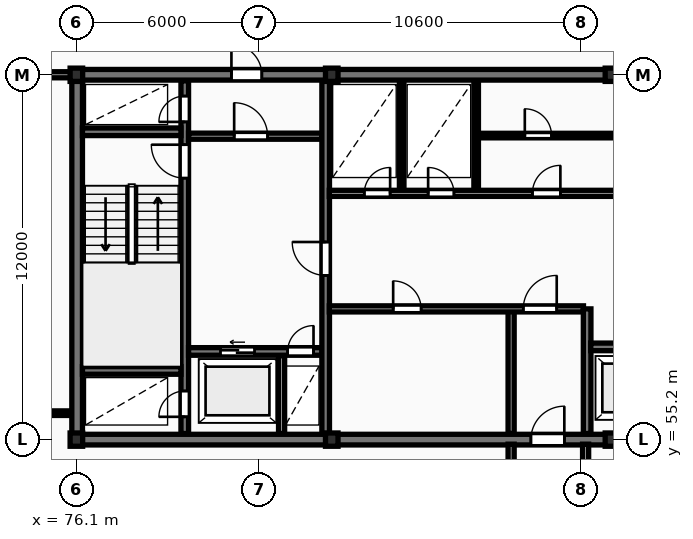
"""IFC4 building model, lengths in metres.
Left out: names, types, materials, properties, quantities, classifications, styles, units other than length and angle.
Written with IfcOpenShell. Run it as: python <this file> out.ifc"""

import sys

from ifc_helpers import new_model, si_unit, direction, frame, frame_2d, origin, origin_2d, place, context, subcontext, project, spatial, rectangle, i_section, extrude, element, fill, save


model = new_model("IFC4")
c1 = context("Model", 3, precision=1e-05, world=origin(), true_north=direction((0.0, 1.0)))
c2 = subcontext(c1, "Body", "Model", "MODEL_VIEW")
j1 = project(units=[si_unit("LENGTHUNIT", "METRE"), si_unit("PLANEANGLEUNIT", "RADIAN")], contexts=[c1])
p1 = place(None, origin())
s1 = spatial("IfcSite", under=j1, at=p1, CompositionType="ELEMENT")
p2 = place(p1, origin())
s2 = spatial("IfcBuilding", under=s1, at=p2, CompositionType="ELEMENT")
p3 = place(p2, frame((0.0, 0.0, 153.7)))
s3 = spatial("IfcBuildingStorey", under=s2, at=p3, CompositionType="ELEMENT", Elevation=153.7)
for number, where, z_axis, x_axis in (
    (1, (76.1, 55.2, 0.0), (0.0, 0.0, 1.0), (1.0, 0.0, 0.0)),
    (2, (76.1, 67.2, 0.0), (0.0, 0.0, 1.0), (1.0, 0.0, 0.0)),
    (3, (84.5, 55.2, 0.0), (0.0, 0.0, 1.0), (1.0, 0.0, 0.0)),
    (4, (84.5, 67.2, 0.0), (0.0, 0.0, 1.0), (1.0, 0.0, 0.0)),
    (5, (93.7, 55.2, 0.0), (0.0, 0.0, 1.0), (1.0, 0.0, 0.0)),
    (6, (93.7, 67.2, 0.0), (0.0, 0.0, 1.0), (1.0, 0.0, 0.0)),
):
    element("IfcColumn", number, at=place(p3, frame(where, z_axis=z_axis, x_axis=x_axis)), inside=s3, PredefinedType="COLUMN", context=c2, shape_type="SweptSolid", body=[
        extrude(i_section(OverallWidth=0.412, OverallDepth=0.437, WebThickness=0.036, FlangeThickness=0.052, FilletRadius=0.015, at=origin_2d()), origin(), (0.0, 0.0, 1.0), 3.6),
    ])
p4 = place(p3, frame((75.95, 55.2, 0.0), z_axis=(0.0, 0.0, 1.0), x_axis=(1.0, 0.0, 0.0)))
e7 = element("IfcWall", 7, at=p4, inside=s3, PredefinedType="SHEAR", context=c2, shape_type="SweptSolid", body=[
    extrude(rectangle(XDim=36.3, YDim=0.35, at=frame_2d((18.15, 0.0))), origin(), (0.0, 0.0, 1.0), 3.6),
])
p5 = place(p4, frame((15.1, 0.0, 0.0)))
e8 = element("IfcOpeningElement", 8, at=p5, cuts=e7, PredefinedType="OPENING", context=c2, shape_type="SweptSolid", body=[
    extrude(rectangle(XDim=1.1, YDim=2.1, at=frame_2d((0.55, 1.05))), frame((0.0, 0.185, 0.0), z_axis=(0.0, -1.0, 0.0), x_axis=(1.0, 0.0, 0.0)), (0.0, 0.0, 1.0), 0.37),
])
p6 = place(p3, frame((76.125, 55.375, 0.0), z_axis=(0.0, 0.0, 1.0), x_axis=(0.0, 1.0, 0.0)))
e9 = element("IfcWall", 9, at=p6, inside=s3, PredefinedType="SHEAR", context=c2, shape_type="SweptSolid", body=[
    extrude(rectangle(XDim=11.65, YDim=0.35, at=frame_2d((5.825, 0.0))), origin(), (0.0, 0.0, 1.0), 3.6),
])
p7 = place(p3, frame((75.95, 67.2, 0.0), z_axis=(0.0, 0.0, 1.0), x_axis=(1.0, 0.0, 0.0)))
e10 = element("IfcWall", 10, at=p7, inside=s3, PredefinedType="SHEAR", context=c2, shape_type="SweptSolid", body=[
    extrude(rectangle(XDim=36.3, YDim=0.35, at=frame_2d((18.15, 0.0))), origin(), (0.0, 0.0, 1.0), 3.6),
])
p8 = place(p7, frame((5.25, 0.0, 0.0)))
e11 = element("IfcOpeningElement", 11, at=p8, cuts=e10, PredefinedType="OPENING", context=c2, shape_type="SweptSolid", body=[
    extrude(rectangle(XDim=1.0, YDim=2.15, at=frame_2d((0.5, 1.075))), frame((0.0, 0.185, 0.0), z_axis=(0.0, -1.0, 0.0), x_axis=(1.0, 0.0, 0.0)), (0.0, 0.0, 1.0), 0.37),
])
p9 = place(p7, frame((21.6, 0.0, 0.0)))
e12 = element("IfcOpeningElement", 12, at=p9, cuts=e10, PredefinedType="OPENING", context=c2, shape_type="SweptSolid", body=[
    extrude(rectangle(XDim=1.5, YDim=2.2, at=frame_2d((0.75, 1.1))), frame((0.0, 0.185, 0.0), z_axis=(0.0, -1.0, 0.0), x_axis=(1.0, 0.0, 0.0)), (0.0, 0.0, 1.0), 0.37),
])
p10 = place(p7, frame((30.45, 0.0, 0.0)))
e13 = element("IfcOpeningElement", 13, at=p10, cuts=e10, PredefinedType="OPENING", context=c2, shape_type="SweptSolid", body=[
    extrude(rectangle(XDim=1.0, YDim=2.15, at=frame_2d((0.5, 1.075))), frame((0.0, 0.185, 0.0), z_axis=(0.0, -1.0, 0.0), x_axis=(1.0, 0.0, 0.0)), (0.0, 0.0, 1.0), 0.37),
])
p11 = place(p3, frame((79.665, 55.4, 0.0), z_axis=(0.0, 0.0, 1.0), x_axis=(0.0, 1.0, 0.0)))
e14 = element("IfcWall", 14, at=p11, inside=s3, PredefinedType="SHEAR", context=c2, shape_type="SweptSolid", body=[
    extrude(rectangle(XDim=11.6, YDim=0.25, at=frame_2d((5.8, 0.0))), origin(), (0.0, 0.0, 1.0), 3.6),
])
p12 = place(p11, frame((0.55, 0.0, 0.0)))
e15 = element("IfcOpeningElement", 15, at=p12, cuts=e14, PredefinedType="OPENING", context=c2, shape_type="SweptSolid", body=[
    extrude(rectangle(XDim=0.85, YDim=2.05, at=frame_2d((0.425, 1.025))), frame((0.0, 0.135, 0.0), z_axis=(0.0, -1.0, 0.0), x_axis=(1.0, 0.0, 0.0)), (0.0, 0.0, 1.0), 0.27),
])
p13 = place(p11, frame((8.4, 0.0, 0.0)))
e16 = element("IfcOpeningElement", 16, at=p13, cuts=e14, PredefinedType="OPENING", context=c2, shape_type="SweptSolid", body=[
    extrude(rectangle(XDim=1.1, YDim=2.1, at=frame_2d((0.55, 1.05))), frame((0.0, 0.135, 0.0), z_axis=(0.0, -1.0, 0.0), x_axis=(1.0, 0.0, 0.0)), (0.0, 0.0, 1.0), 0.27),
])
p14 = place(p11, frame((10.25, 0.0, 0.0)))
e17 = element("IfcOpeningElement", 17, at=p14, cuts=e14, PredefinedType="OPENING", context=c2, shape_type="SweptSolid", body=[
    extrude(rectangle(XDim=0.85, YDim=2.05, at=frame_2d((0.425, 1.025))), frame((0.0, 0.135, 0.0), z_axis=(0.0, -1.0, 0.0), x_axis=(1.0, 0.0, 0.0)), (0.0, 0.0, 1.0), 0.27),
])
for number, where, z_axis, x_axis in (
    (18, (76.3, 57.475, 0.0), (0.0, 0.0, 1.0), (1.0, 0.0, 0.0)),
    (19, (76.3, 65.325, 0.0), (0.0, 0.0, 1.0), (1.0, 0.0, 0.0)),
):
    element("IfcWall", number, at=place(p3, frame(where, z_axis=z_axis, x_axis=x_axis)), inside=s3, PredefinedType="SHEAR", context=c2, shape_type="SweptSolid", body=[
        extrude(rectangle(XDim=3.24, YDim=0.25, at=frame_2d((1.62, 0.0))), origin(), (0.0, 0.0, 1.0), 3.6),
    ])
p15 = place(p3, frame((79.79, 58.1, 0.0), z_axis=(0.0, 0.0, 1.0), x_axis=(1.0, 0.0, 0.0)))
e20 = element("IfcWall", 20, at=p15, inside=s3, PredefinedType="SHEAR", context=c2, shape_type="SweptSolid", body=[
    extrude(rectangle(XDim=4.39, YDim=0.25, at=frame_2d((2.195, 0.0))), origin(), (0.0, 0.0, 1.0), 3.6),
])
p16 = place(p15, frame((1.05, 0.0, 0.0)))
e21 = element("IfcOpeningElement", 21, at=p16, cuts=e20, PredefinedType="OPENING", context=c2, shape_type="SweptSolid", body=[
    extrude(rectangle(XDim=1.12, YDim=2.12, at=frame_2d((0.56, 1.06))), frame((0.0, 0.135, 0.0), z_axis=(0.0, -1.0, 0.0), x_axis=(1.0, 0.0, 0.0)), (0.0, 0.0, 1.0), 0.27),
])
p17 = place(p15, frame((3.26, 0.0, 0.0)))
e22 = element("IfcOpeningElement", 22, at=p17, cuts=e20, PredefinedType="OPENING", context=c2, shape_type="SweptSolid", body=[
    extrude(rectangle(XDim=0.85, YDim=2.05, at=frame_2d((0.425, 1.025))), frame((0.0, 0.135, 0.0), z_axis=(0.0, -1.0, 0.0), x_axis=(1.0, 0.0, 0.0)), (0.0, 0.0, 1.0), 0.27),
])
p18 = place(p3, frame((82.85, 55.4, 0.0), z_axis=(0.0, 0.0, 1.0), x_axis=(0.0, 1.0, 0.0)))
e23 = element("IfcWall", 23, at=p18, inside=s3, PredefinedType="PARTITIONING", context=c2, shape_type="SweptSolid", body=[
    extrude(rectangle(XDim=2.56, YDim=0.2, at=frame_2d((1.28, 0.0))), origin(), (0.0, 0.0, 1.0), 3.32),
])
p19 = place(p3, frame((79.79, 65.18, 0.0), z_axis=(0.0, 0.0, 1.0), x_axis=(1.0, 0.0, 0.0)))
e24 = element("IfcWall", 24, at=p19, inside=s3, PredefinedType="PARTITIONING", context=c2, shape_type="SweptSolid", body=[
    extrude(rectangle(XDim=4.39, YDim=0.2, at=frame_2d((2.195, 0.0))), origin(), (0.0, 0.0, 1.0), 3.32),
])
p20 = place(p19, frame((1.5, 0.0, 0.0)))
e25 = element("IfcOpeningElement", 25, at=p20, cuts=e24, PredefinedType="OPENING", context=c2, shape_type="SweptSolid", body=[
    extrude(rectangle(XDim=1.1, YDim=2.1, at=frame_2d((0.55, 1.05))), frame((0.0, 0.11, 0.0), z_axis=(0.0, -1.0, 0.0), x_axis=(1.0, 0.0, 0.0)), (0.0, 0.0, 1.0), 0.22),
])
p21 = place(p3, frame((84.3, 55.4, 0.0), z_axis=(0.0, 0.0, 1.0), x_axis=(0.0, 1.0, 0.0)))
e26 = element("IfcWall", 26, at=p21, inside=s3, PredefinedType="SHEAR", context=c2, shape_type="SweptSolid", body=[
    extrude(rectangle(XDim=11.6, YDim=0.25, at=frame_2d((5.8, 0.0))), origin(), (0.0, 0.0, 1.0), 3.6),
])
p22 = place(p21, frame((5.2, 0.0, 0.0)))
e27 = element("IfcOpeningElement", 27, at=p22, cuts=e26, PredefinedType="OPENING", context=c2, shape_type="SweptSolid", body=[
    extrude(rectangle(XDim=1.1, YDim=2.1, at=frame_2d((0.55, 1.05))), frame((0.0, 0.135, 0.0), z_axis=(0.0, -1.0, 0.0), x_axis=(1.0, 0.0, 0.0)), (0.0, 0.0, 1.0), 0.27),
])
p23 = place(p3, frame((90.4, 55.4, 0.0), z_axis=(0.0, 0.0, 1.0), x_axis=(0.0, 1.0, 0.0)))
e28 = element("IfcWall", 28, at=p23, inside=s3, PredefinedType="PARTITIONING", context=c2, shape_type="SweptSolid", body=[
    extrude(rectangle(XDim=4.1, YDim=0.2, at=frame_2d((2.05, 0.0))), origin(), (0.0, 0.0, 1.0), 3.32),
])
p24 = place(p3, frame((84.42, 59.5, 0.0), z_axis=(0.0, 0.0, 1.0), x_axis=(1.0, 0.0, 0.0)))
e29 = element("IfcWall", 29, at=p24, inside=s3, PredefinedType="PARTITIONING", context=c2, shape_type="SweptSolid", body=[
    extrude(rectangle(XDim=8.36, YDim=0.2, at=frame_2d((4.18, 0.0))), origin(), (0.0, 0.0, 1.0), 3.32),
])
p25 = place(p24, frame((2.1, 0.0, 0.0)))
e30 = element("IfcOpeningElement", 30, at=p25, cuts=e29, PredefinedType="OPENING", context=c2, shape_type="SweptSolid", body=[
    extrude(rectangle(XDim=0.92, YDim=2.08, at=frame_2d((0.46, 1.04))), frame((0.0, 0.11, 0.0), z_axis=(0.0, -1.0, 0.0), x_axis=(1.0, 0.0, 0.0)), (0.0, 0.0, 1.0), 0.22),
])
p26 = place(p24, frame((6.38, 0.0, 0.0)))
e31 = element("IfcOpeningElement", 31, at=p26, cuts=e29, PredefinedType="OPENING", context=c2, shape_type="SweptSolid", body=[
    extrude(rectangle(XDim=1.1, YDim=2.1, at=frame_2d((0.55, 1.05))), frame((0.0, 0.11, 0.0), z_axis=(0.0, -1.0, 0.0), x_axis=(1.0, 0.0, 0.0)), (0.0, 0.0, 1.0), 0.22),
])
p27 = place(p3, frame((92.9, 55.4, 0.0), z_axis=(0.0, 0.0, 1.0), x_axis=(0.0, 1.0, 0.0)))
e32 = element("IfcWall", 32, at=p27, inside=s3, PredefinedType="SHEAR", context=c2, shape_type="SweptSolid", body=[
    extrude(rectangle(XDim=4.1, YDim=0.25, at=frame_2d((2.05, 0.0))), origin(), (0.0, 0.0, 1.0), 3.6),
])
p28 = place(p3, frame((93.02, 58.25, 0.0), z_axis=(0.0, 0.0, 1.0), x_axis=(1.0, 0.0, 0.0)))
e33 = element("IfcWall", 33, at=p28, inside=s3, PredefinedType="SHEAR", context=c2, shape_type="SweptSolid", body=[
    extrude(rectangle(XDim=8.36, YDim=0.25, at=frame_2d((4.18, 0.0))), origin(), (0.0, 0.0, 1.0), 3.6),
])
p29 = place(p28, frame((0.82, 0.0, 0.0)))
e34 = element("IfcOpeningElement", 34, at=p29, cuts=e33, PredefinedType="OPENING", context=c2, shape_type="SweptSolid", body=[
    extrude(rectangle(XDim=1.12, YDim=2.12, at=frame_2d((0.56, 1.06))), frame((0.0, 0.135, 0.0), z_axis=(0.0, -1.0, 0.0), x_axis=(1.0, 0.0, 0.0)), (0.0, 0.0, 1.0), 0.27),
])
p30 = place(p28, frame((3.62, 0.0, 0.0)))
e35 = element("IfcOpeningElement", 35, at=p30, cuts=e33, PredefinedType="OPENING", context=c2, shape_type="SweptSolid", body=[
    extrude(rectangle(XDim=1.12, YDim=2.12, at=frame_2d((0.56, 1.06))), frame((0.0, 0.135, 0.0), z_axis=(0.0, -1.0, 0.0), x_axis=(1.0, 0.0, 0.0)), (0.0, 0.0, 1.0), 0.27),
])
p31 = place(p28, frame((6.42, 0.0, 0.0)))
e36 = element("IfcOpeningElement", 36, at=p31, cuts=e33, PredefinedType="OPENING", context=c2, shape_type="SweptSolid", body=[
    extrude(rectangle(XDim=1.12, YDim=2.12, at=frame_2d((0.56, 1.06))), frame((0.0, 0.135, 0.0), z_axis=(0.0, -1.0, 0.0), x_axis=(1.0, 0.0, 0.0)), (0.0, 0.0, 1.0), 0.27),
])
for number, where, z_axis, x_axis in (
    (37, (86.8, 63.4, 0.0), (0.0, 0.0, 1.0), (0.0, 1.0, 0.0)),
    (38, (89.25, 63.4, 0.0), (0.0, 0.0, 1.0), (0.0, 1.0, 0.0)),
):
    element("IfcWall", number, at=place(p3, frame(where, z_axis=z_axis, x_axis=x_axis)), inside=s3, PredefinedType="PARTITIONING", context=c2, shape_type="SweptSolid", body=[
        extrude(rectangle(XDim=3.6, YDim=0.15, at=frame_2d((1.8, 0.0))), origin(), (0.0, 0.0, 1.0), 3.32),
    ])
p32 = place(p3, frame((89.25, 65.2, 0.0), z_axis=(0.0, 0.0, 1.0), x_axis=(1.0, 0.0, 0.0)))
e39 = element("IfcWall", 39, at=p32, inside=s3, PredefinedType="PARTITIONING", context=c2, shape_type="SweptSolid", body=[
    extrude(rectangle(XDim=7.05, YDim=0.15, at=frame_2d((3.525, 0.0))), origin(), (0.0, 0.0, 1.0), 3.32),
])
p33 = place(p32, frame((1.6, 0.0, 0.0)))
e40 = element("IfcOpeningElement", 40, at=p33, cuts=e39, PredefinedType="OPENING", context=c2, shape_type="SweptSolid", body=[
    extrude(rectangle(XDim=0.88, YDim=2.06, at=frame_2d((0.44, 1.03))), frame((0.0, 0.085, 0.0), z_axis=(0.0, -1.0, 0.0), x_axis=(1.0, 0.0, 0.0)), (0.0, 0.0, 1.0), 0.17),
])
p34 = place(p3, frame((84.42, 63.3, 0.0), z_axis=(0.0, 0.0, 1.0), x_axis=(1.0, 0.0, 0.0)))
e41 = element("IfcWall", 41, at=p34, inside=s3, PredefinedType="PARTITIONING", context=c2, shape_type="SweptSolid", body=[
    extrude(rectangle(XDim=19.83, YDim=0.2, at=frame_2d((9.915, 0.0))), origin(), (0.0, 0.0, 1.0), 3.32),
])
p35 = place(p34, frame((1.15, 0.0, 0.0)))
e42 = element("IfcOpeningElement", 42, at=p35, cuts=e41, PredefinedType="OPENING", context=c2, shape_type="SweptSolid", body=[
    extrude(rectangle(XDim=0.85, YDim=2.05, at=frame_2d((0.425, 1.025))), frame((0.0, 0.11, 0.0), z_axis=(0.0, -1.0, 0.0), x_axis=(1.0, 0.0, 0.0)), (0.0, 0.0, 1.0), 0.22),
])
p36 = place(p34, frame((3.25, 0.0, 0.0)))
e43 = element("IfcOpeningElement", 43, at=p36, cuts=e41, PredefinedType="OPENING", context=c2, shape_type="SweptSolid", body=[
    extrude(rectangle(XDim=0.85, YDim=2.05, at=frame_2d((0.425, 1.025))), frame((0.0, 0.11, 0.0), z_axis=(0.0, -1.0, 0.0), x_axis=(1.0, 0.0, 0.0)), (0.0, 0.0, 1.0), 0.22),
])
p37 = place(p34, frame((13.08, 0.0, 0.0)))
e44 = element("IfcOpeningElement", 44, at=p37, cuts=e41, PredefinedType="OPENING", context=c2, shape_type="SweptSolid", body=[
    extrude(rectangle(XDim=1.5, YDim=2.2, at=frame_2d((0.75, 1.1))), frame((0.0, 0.11, 0.0), z_axis=(0.0, -1.0, 0.0), x_axis=(1.0, 0.0, 0.0)), (0.0, 0.0, 1.0), 0.22),
])
p38 = place(p34, frame((6.68, 0.0, 0.0)))
e45 = element("IfcOpeningElement", 45, at=p38, cuts=e41, PredefinedType="OPENING", context=c2, shape_type="SweptSolid", body=[
    extrude(rectangle(XDim=0.92, YDim=2.08, at=frame_2d((0.46, 1.04))), frame((0.0, 0.11, 0.0), z_axis=(0.0, -1.0, 0.0), x_axis=(1.0, 0.0, 0.0)), (0.0, 0.0, 1.0), 0.22),
])
p39 = place(p34, frame((16.33, 0.0, 0.0)))
e46 = element("IfcOpeningElement", 46, at=p39, cuts=e41, PredefinedType="OPENING", context=c2, shape_type="SweptSolid", body=[
    extrude(rectangle(XDim=0.88, YDim=2.06, at=frame_2d((0.44, 1.03))), frame((0.0, 0.11, 0.0), z_axis=(0.0, -1.0, 0.0), x_axis=(1.0, 0.0, 0.0)), (0.0, 0.0, 1.0), 0.22),
])
p40 = place(p3, frame((69.17, 56.07, 0.0), z_axis=(0.0, 0.0, 1.0), x_axis=(1.0, 0.0, 0.0)))
e47 = element("IfcWall", 47, at=p40, inside=s3, PredefinedType="PARTITIONING", context=c2, shape_type="SweptSolid", body=[
    extrude(rectangle(XDim=6.76, YDim=0.15, at=frame_2d((3.38, 0.0))), origin(), (0.0, 0.0, 1.0), 3.32),
])
p41 = place(p40, frame((1.362, 0.0, 0.0)))
e48 = element("IfcOpeningElement", 48, at=p41, cuts=e47, PredefinedType="OPENING", context=c2, shape_type="SweptSolid", body=[
    extrude(rectangle(XDim=0.84, YDim=2.04, at=frame_2d((0.42, 1.02))), frame((0.0, 0.085, 0.0), z_axis=(0.0, -1.0, 0.0), x_axis=(1.0, 0.0, 0.0)), (0.0, 0.0, 1.0), 0.17),
])
p42 = place(p40, frame((4.277, 0.0, 0.0)))
e49 = element("IfcOpeningElement", 49, at=p42, cuts=e47, PredefinedType="OPENING", context=c2, shape_type="SweptSolid", body=[
    extrude(rectangle(XDim=0.88, YDim=2.06, at=frame_2d((0.44, 1.03))), frame((0.0, 0.085, 0.0), z_axis=(0.0, -1.0, 0.0), x_axis=(1.0, 0.0, 0.0)), (0.0, 0.0, 1.0), 0.17),
])
p43 = place(p3, frame((57.6, 67.2, 0.0), z_axis=(0.0, 0.0, 1.0), x_axis=(1.0, 0.0, 0.0)))
e50 = element("IfcWall", 50, at=p43, inside=s3, PredefinedType="PARTITIONING", context=c2, shape_type="SweptSolid", body=[
    extrude(rectangle(XDim=18.35, YDim=0.2, at=frame_2d((9.175, 0.0))), origin(), (0.0, 0.0, 1.0), 2.783),
])
p44 = place(p43, frame((11.87, 0.0, 0.0)))
e51 = element("IfcOpeningElement", 51, at=p44, cuts=e50, PredefinedType="OPENING", context=c2, shape_type="SweptSolid", body=[
    extrude(rectangle(XDim=0.95, YDim=2.15, at=frame_2d((0.475, 1.075))), frame((0.0, 0.11, 0.0), z_axis=(0.0, -1.0, 0.0), x_axis=(1.0, 0.0, 0.0)), (0.0, 0.0, 1.0), 0.22),
])
for number, where, z_axis, x_axis in (
    (52, (90.4, 50.85, 0.0), (0.0, 0.0, 1.0), (0.0, 1.0, 0.0)),
    (53, (92.85, 50.85, 0.0), (0.0, 0.0, 1.0), (0.0, 1.0, 0.0)),
):
    element("IfcWall", number, at=place(p3, frame(where, z_axis=z_axis, x_axis=x_axis)), inside=s3, PredefinedType="PARTITIONING", context=c2, shape_type="SweptSolid", body=[
        extrude(rectangle(XDim=4.2, YDim=0.2, at=frame_2d((2.1, 0.0))), origin(), (0.0, 0.0, 1.0), 3.32),
    ])
p45 = place(p5, origin())
e54 = element("IfcDoor", 54, at=p45, inside=s3, OperationType="SINGLE_SWING_RIGHT", PredefinedType="DOOR", context=c2, shape_type="SweptSolid", body=[
    extrude(rectangle(XDim=1.1, YDim=2.1, at=frame_2d((0.55, 1.05))), frame((0.0, 0.025, 0.0), z_axis=(0.0, -1.0, 0.0), x_axis=(1.0, 0.0, 0.0)), (0.0, 0.0, 1.0), 0.05),
])
fill(e8, e54)
p46 = place(p8, origin())
e55 = element("IfcDoor", 55, at=p46, inside=s3, OperationType="SINGLE_SWING_LEFT", PredefinedType="DOOR", context=c2, shape_type="SweptSolid", body=[
    extrude(rectangle(XDim=1.0, YDim=2.15, at=frame_2d((0.5, 1.075))), frame((0.0, 0.025, 0.0), z_axis=(0.0, -1.0, 0.0), x_axis=(1.0, 0.0, 0.0)), (0.0, 0.0, 1.0), 0.05),
])
fill(e11, e55)
p47 = place(p12, origin())
e56 = element("IfcDoor", 56, at=p47, inside=s3, OperationType="SINGLE_SWING_LEFT", PredefinedType="DOOR", context=c2, shape_type="SweptSolid", body=[
    extrude(rectangle(XDim=0.85, YDim=2.05, at=frame_2d((0.425, 1.025))), frame((0.0, 0.025, 0.0), z_axis=(0.0, -1.0, 0.0), x_axis=(1.0, 0.0, 0.0)), (0.0, 0.0, 1.0), 0.05),
])
fill(e15, e56)
p48 = place(p13, origin())
e57 = element("IfcDoor", 57, at=p48, inside=s3, OperationType="SINGLE_SWING_RIGHT", PredefinedType="DOOR", context=c2, shape_type="SweptSolid", body=[
    extrude(rectangle(XDim=1.1, YDim=2.1, at=frame_2d((0.55, 1.05))), frame((0.0, 0.025, 0.0), z_axis=(0.0, -1.0, 0.0), x_axis=(1.0, 0.0, 0.0)), (0.0, 0.0, 1.0), 0.05),
])
fill(e16, e57)
p49 = place(p14, origin())
e58 = element("IfcDoor", 58, at=p49, inside=s3, OperationType="SINGLE_SWING_LEFT", PredefinedType="DOOR", context=c2, shape_type="SweptSolid", body=[
    extrude(rectangle(XDim=0.85, YDim=2.05, at=frame_2d((0.425, 1.025))), frame((0.0, 0.025, 0.0), z_axis=(0.0, -1.0, 0.0), x_axis=(1.0, 0.0, 0.0)), (0.0, 0.0, 1.0), 0.05),
])
fill(e17, e58)
p50 = place(p16, origin())
e59 = element("IfcDoor", 59, at=p50, inside=s3, OperationType="SLIDING_TO_LEFT", PredefinedType="DOOR", context=c2, shape_type="SweptSolid", body=[
    extrude(rectangle(XDim=1.12, YDim=2.12, at=frame_2d((0.56, 1.06))), frame((0.0, 0.025, 0.0), z_axis=(0.0, -1.0, 0.0), x_axis=(1.0, 0.0, 0.0)), (0.0, 0.0, 1.0), 0.05),
])
fill(e21, e59)
p51 = place(p17, origin())
e60 = element("IfcDoor", 60, at=p51, inside=s3, OperationType="SINGLE_SWING_RIGHT", PredefinedType="DOOR", context=c2, shape_type="SweptSolid", body=[
    extrude(rectangle(XDim=0.85, YDim=2.05, at=frame_2d((0.425, 1.025))), frame((0.0, 0.025, 0.0), z_axis=(0.0, -1.0, 0.0), x_axis=(1.0, 0.0, 0.0)), (0.0, 0.0, 1.0), 0.05),
])
fill(e22, e60)
p52 = place(p20, origin())
e61 = element("IfcDoor", 61, at=p52, inside=s3, OperationType="SINGLE_SWING_LEFT", PredefinedType="DOOR", context=c2, shape_type="SweptSolid", body=[
    extrude(rectangle(XDim=1.1, YDim=2.1, at=frame_2d((0.55, 1.05))), frame((0.0, 0.025, 0.0), z_axis=(0.0, -1.0, 0.0), x_axis=(1.0, 0.0, 0.0)), (0.0, 0.0, 1.0), 0.05),
])
fill(e25, e61)
p53 = place(p22, origin())
e62 = element("IfcDoor", 62, at=p53, inside=s3, OperationType="SINGLE_SWING_RIGHT", PredefinedType="DOOR", context=c2, shape_type="SweptSolid", body=[
    extrude(rectangle(XDim=1.1, YDim=2.1, at=frame_2d((0.55, 1.05))), frame((0.0, 0.025, 0.0), z_axis=(0.0, -1.0, 0.0), x_axis=(1.0, 0.0, 0.0)), (0.0, 0.0, 1.0), 0.05),
])
fill(e27, e62)
p54 = place(p25, origin())
e63 = element("IfcDoor", 63, at=p54, inside=s3, OperationType="SINGLE_SWING_LEFT", PredefinedType="DOOR", context=c2, shape_type="SweptSolid", body=[
    extrude(rectangle(XDim=0.92, YDim=2.08, at=frame_2d((0.46, 1.04))), frame((0.0, 0.025, 0.0), z_axis=(0.0, -1.0, 0.0), x_axis=(1.0, 0.0, 0.0)), (0.0, 0.0, 1.0), 0.05),
])
fill(e30, e63)
p55 = place(p26, origin())
e64 = element("IfcDoor", 64, at=p55, inside=s3, OperationType="SINGLE_SWING_RIGHT", PredefinedType="DOOR", context=c2, shape_type="SweptSolid", body=[
    extrude(rectangle(XDim=1.1, YDim=2.1, at=frame_2d((0.55, 1.05))), frame((0.0, 0.025, 0.0), z_axis=(0.0, -1.0, 0.0), x_axis=(1.0, 0.0, 0.0)), (0.0, 0.0, 1.0), 0.05),
])
fill(e31, e64)
p56 = place(p33, origin())
e65 = element("IfcDoor", 65, at=p56, inside=s3, OperationType="SINGLE_SWING_LEFT", PredefinedType="DOOR", context=c2, shape_type="SweptSolid", body=[
    extrude(rectangle(XDim=0.88, YDim=2.06, at=frame_2d((0.44, 1.03))), frame((0.0, 0.025, 0.0), z_axis=(0.0, -1.0, 0.0), x_axis=(1.0, 0.0, 0.0)), (0.0, 0.0, 1.0), 0.05),
])
fill(e40, e65)
p57 = place(p35, origin())
e66 = element("IfcDoor", 66, at=p57, inside=s3, OperationType="SINGLE_SWING_RIGHT", PredefinedType="DOOR", context=c2, shape_type="SweptSolid", body=[
    extrude(rectangle(XDim=0.85, YDim=2.05, at=frame_2d((0.425, 1.025))), frame((0.0, 0.025, 0.0), z_axis=(0.0, -1.0, 0.0), x_axis=(1.0, 0.0, 0.0)), (0.0, 0.0, 1.0), 0.05),
])
fill(e42, e66)
p58 = place(p36, origin())
e67 = element("IfcDoor", 67, at=p58, inside=s3, OperationType="SINGLE_SWING_LEFT", PredefinedType="DOOR", context=c2, shape_type="SweptSolid", body=[
    extrude(rectangle(XDim=0.85, YDim=2.05, at=frame_2d((0.425, 1.025))), frame((0.0, 0.025, 0.0), z_axis=(0.0, -1.0, 0.0), x_axis=(1.0, 0.0, 0.0)), (0.0, 0.0, 1.0), 0.05),
])
fill(e43, e67)
p59 = place(p38, origin())
e68 = element("IfcDoor", 68, at=p59, inside=s3, OperationType="SINGLE_SWING_RIGHT", PredefinedType="DOOR", context=c2, shape_type="SweptSolid", body=[
    extrude(rectangle(XDim=0.92, YDim=2.08, at=frame_2d((0.46, 1.04))), frame((0.0, 0.025, 0.0), z_axis=(0.0, -1.0, 0.0), x_axis=(1.0, 0.0, 0.0)), (0.0, 0.0, 1.0), 0.05),
])
fill(e45, e68)
save(model, sys.argv[1])
